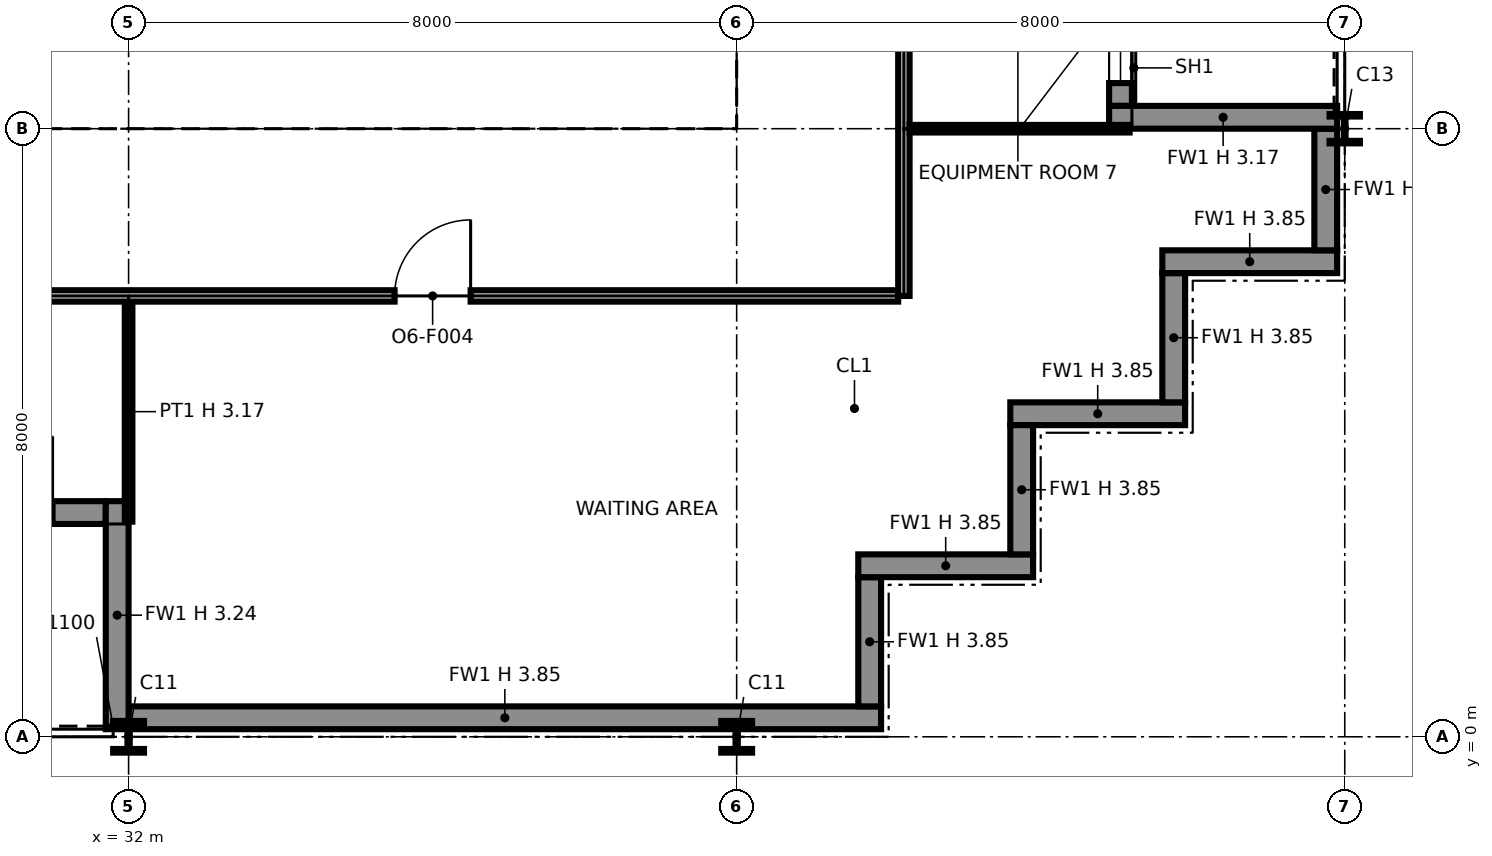
"""IFC4 building model, lengths in metres.
Left out: names, types, materials, properties, quantities, classifications, styles, units other than length and angle.
Written with IfcOpenShell. Run it as: python <this file> out.ifc"""

import sys

from ifc_helpers import new_model, si_unit, direction, frame, frame_2d, origin, origin_2d, place, context, subcontext, project, spatial, polyline, rectangle, i_section, outline, extrude, element, fill, save


model = new_model("IFC4")
c1 = context("Model", 3, precision=1e-05, world=origin(), true_north=direction((0.0, 1.0)))
c2 = subcontext(c1, "Body", "Model", "MODEL_VIEW")
j1 = project(units=[si_unit("LENGTHUNIT", "METRE"), si_unit("PLANEANGLEUNIT", "RADIAN")], contexts=[c1])
p1 = place(None, origin())
s1 = spatial("IfcSite", under=j1, at=p1, CompositionType="ELEMENT")
p2 = place(p1, origin())
s2 = spatial("IfcBuilding", under=s1, at=p2, CompositionType="ELEMENT")
p3 = place(p2, frame((0.0, 0.0, 233.0)))
s3 = spatial("IfcBuildingStorey", under=s2, at=p3, CompositionType="ELEMENT", Elevation=233.0)
p4 = place(p3, frame((32.0, 0.0, 0.0), z_axis=(0.0, 0.0, 1.0), x_axis=(1.0, 0.0, 0.0)))
e1 = element("IfcColumn", 1, at=p4, inside=s3, PredefinedType="COLUMN", context=c2, shape_type="SweptSolid", body=[
    extrude(i_section(OverallWidth=0.406, OverallDepth=0.417, WebThickness=0.03, FlangeThickness=0.048, at=origin_2d()), origin(), (0.0, 0.0, 1.0), 3.85),
])
p5 = place(p3, frame((32.0, 8.0, 0.0), z_axis=(0.0, 0.0, 1.0), x_axis=(1.0, 0.0, 0.0)))
e2 = element("IfcColumn", 2, at=p5, inside=s3, PredefinedType="COLUMN", context=c2, shape_type="SweptSolid", body=[
    extrude(i_section(OverallWidth=0.373, OverallDepth=0.368, WebThickness=0.015, FlangeThickness=0.024, at=origin_2d()), origin(), (0.0, 0.0, 1.0), 3.85),
])
p6 = place(p3, frame((40.0, 0.0, 0.0), z_axis=(0.0, 0.0, 1.0), x_axis=(1.0, 0.0, 0.0)))
e3 = element("IfcColumn", 3, at=p6, inside=s3, PredefinedType="COLUMN", context=c2, shape_type="SweptSolid", body=[
    extrude(i_section(OverallWidth=0.406, OverallDepth=0.417, WebThickness=0.03, FlangeThickness=0.048, at=origin_2d()), origin(), (0.0, 0.0, 1.0), 3.85),
])
p7 = place(p3, frame((40.0, 8.0, 0.0), z_axis=(0.0, 0.0, 1.0), x_axis=(1.0, 0.0, 0.0)))
e4 = element("IfcColumn", 4, at=p7, inside=s3, PredefinedType="COLUMN", context=c2, shape_type="SweptSolid", body=[
    extrude(i_section(OverallWidth=0.373, OverallDepth=0.368, WebThickness=0.015, FlangeThickness=0.024, at=origin_2d()), origin(), (0.0, 0.0, 1.0), 3.85),
])
p8 = place(p3, frame((48.0, 8.0, 0.0), z_axis=(0.0, 0.0, 1.0), x_axis=(1.0, 0.0, 0.0)))
e5 = element("IfcColumn", 5, at=p8, inside=s3, PredefinedType="COLUMN", context=c2, shape_type="SweptSolid", body=[
    extrude(i_section(OverallWidth=0.399, OverallDepth=0.386, WebThickness=0.021, FlangeThickness=0.033, at=origin_2d()), origin(), (0.0, 0.0, 1.0), 3.85),
])
p9 = place(p3, frame((24.3, 2.95, 0.0), z_axis=(0.0, 0.0, 1.0), x_axis=(1.0, 0.0, 0.0)))
e6 = element("IfcWall", 6, at=p9, inside=s3, PredefinedType="SOLIDWALL", context=c2, shape_type="SweptSolid", body=[
    extrude(rectangle(XDim=7.4, YDim=0.3, at=frame_2d((3.7, 0.0))), origin(), (0.0, 0.0, 1.0), 3.85),
])
p10 = place(p9, frame((0.3, 0.0, 0.9)))
e7 = element("IfcOpeningElement", 7, at=p10, cuts=e6, PredefinedType="OPENING", context=c2, shape_type="SweptSolid", body=[
    extrude(rectangle(XDim=2.8, YDim=2.2, at=frame_2d((1.4, 1.1))), frame((0.0, 0.16, 0.0), z_axis=(0.0, -1.0, 0.0), x_axis=(1.0, 0.0, 0.0)), (0.0, 0.0, 1.0), 0.32),
])
p11 = place(p9, frame((4.7, 0.0, 0.0)))
e8 = element("IfcOpeningElement", 8, at=p11, cuts=e6, PredefinedType="OPENING", context=c2, shape_type="SweptSolid", body=[
    extrude(rectangle(XDim=2.0, YDim=2.4, at=frame_2d((1.0, 1.2))), frame((0.0, 0.16, 0.0), z_axis=(0.0, -1.0, 0.0), x_axis=(1.0, 0.0, 0.0)), (0.0, 0.0, 1.0), 0.32),
])
p12 = place(p3, frame((31.85, 0.1, 0.0), z_axis=(0.0, 0.0, 1.0), x_axis=(0.0, 1.0, 0.0)))
e9 = element("IfcWall", 9, at=p12, inside=s3, PredefinedType="SOLIDWALL", context=c2, shape_type="SweptSolid", body=[
    extrude(rectangle(XDim=3.0, YDim=0.3, at=frame_2d((1.5, 0.0))), origin(), (0.0, 0.0, 1.0), 3.237),
])
p13 = place(p3, frame((32.0, 0.25, 0.0), z_axis=(0.0, 0.0, 1.0), x_axis=(1.0, 0.0, 0.0)))
e10 = element("IfcWall", 10, at=p13, inside=s3, PredefinedType="SOLIDWALL", context=c2, shape_type="SweptSolid", body=[
    extrude(rectangle(XDim=9.9, YDim=0.3, at=frame_2d((4.95, 0.0))), origin(), (0.0, 0.0, 1.0), 3.85),
])
p14 = place(p3, frame((41.75, 0.4, 0.0), z_axis=(0.0, 0.0, 1.0), x_axis=(0.0, 1.0, 0.0)))
e11 = element("IfcWall", 11, at=p14, inside=s3, PredefinedType="SOLIDWALL", context=c2, shape_type="SweptSolid", body=[
    extrude(rectangle(XDim=1.7, YDim=0.3, at=frame_2d((0.85, 0.0))), origin(), (0.0, 0.0, 1.0), 3.85),
])
p15 = place(p3, frame((41.6, 2.25, 0.0), z_axis=(0.0, 0.0, 1.0), x_axis=(1.0, 0.0, 0.0)))
e12 = element("IfcWall", 12, at=p15, inside=s3, PredefinedType="SOLIDWALL", context=c2, shape_type="SweptSolid", body=[
    extrude(rectangle(XDim=2.3, YDim=0.3, at=frame_2d((1.15, 0.0))), origin(), (0.0, 0.0, 1.0), 3.85),
])
p16 = place(p3, frame((43.75, 2.4, 0.0), z_axis=(0.0, 0.0, 1.0), x_axis=(0.0, 1.0, 0.0)))
e13 = element("IfcWall", 13, at=p16, inside=s3, PredefinedType="SOLIDWALL", context=c2, shape_type="SweptSolid", body=[
    extrude(rectangle(XDim=1.7, YDim=0.3, at=frame_2d((0.85, 0.0))), origin(), (0.0, 0.0, 1.0), 3.85),
])
p17 = place(p3, frame((43.6, 4.25, 0.0), z_axis=(0.0, 0.0, 1.0), x_axis=(1.0, 0.0, 0.0)))
e14 = element("IfcWall", 14, at=p17, inside=s3, PredefinedType="SOLIDWALL", context=c2, shape_type="SweptSolid", body=[
    extrude(rectangle(XDim=2.3, YDim=0.3, at=frame_2d((1.15, 0.0))), origin(), (0.0, 0.0, 1.0), 3.85),
])
p18 = place(p3, frame((45.75, 4.4, 0.0), z_axis=(0.0, 0.0, 1.0), x_axis=(0.0, 1.0, 0.0)))
e15 = element("IfcWall", 15, at=p18, inside=s3, PredefinedType="SOLIDWALL", context=c2, shape_type="SweptSolid", body=[
    extrude(rectangle(XDim=1.7, YDim=0.3, at=frame_2d((0.85, 0.0))), origin(), (0.0, 0.0, 1.0), 3.85),
])
p19 = place(p3, frame((45.6, 6.25, 0.0), z_axis=(0.0, 0.0, 1.0), x_axis=(1.0, 0.0, 0.0)))
e16 = element("IfcWall", 16, at=p19, inside=s3, PredefinedType="SOLIDWALL", context=c2, shape_type="SweptSolid", body=[
    extrude(rectangle(XDim=2.3, YDim=0.3, at=frame_2d((1.15, 0.0))), origin(), (0.0, 0.0, 1.0), 3.85),
])
p20 = place(p3, frame((47.75, 6.4, 0.0), z_axis=(0.0, 0.0, 1.0), x_axis=(0.0, 1.0, 0.0)))
e17 = element("IfcWall", 17, at=p20, inside=s3, PredefinedType="SOLIDWALL", context=c2, shape_type="SweptSolid", body=[
    extrude(rectangle(XDim=1.6, YDim=0.3, at=frame_2d((0.8, 0.0))), origin(), (0.0, 0.0, 1.0), 3.85),
])
p21 = place(p3, frame((45.05, 8.3, 0.0), z_axis=(0.0, 0.0, 1.0), x_axis=(0.0, 1.0, 0.0)))
e18 = element("IfcWall", 18, at=p21, inside=s3, PredefinedType="SOLIDWALL", context=c2, shape_type="SweptSolid", body=[
    extrude(rectangle(XDim=7.4, YDim=0.3, at=frame_2d((3.7, 0.0))), origin(), (0.0, 0.0, 1.0), 3.85),
])
p22 = place(p21, frame((0.3, 0.0, 0.9)))
e19 = element("IfcOpeningElement", 19, at=p22, cuts=e18, PredefinedType="OPENING", context=c2, shape_type="SweptSolid", body=[
    extrude(rectangle(XDim=2.8, YDim=2.2, at=frame_2d((1.4, 1.1))), frame((0.0, 0.16, 0.0), z_axis=(0.0, -1.0, 0.0), x_axis=(1.0, 0.0, 0.0)), (0.0, 0.0, 1.0), 0.32),
])
p23 = place(p21, frame((4.7, 0.0, 0.0)))
e20 = element("IfcOpeningElement", 20, at=p23, cuts=e18, PredefinedType="OPENING", context=c2, shape_type="SweptSolid", body=[
    extrude(rectangle(XDim=2.0, YDim=2.4, at=frame_2d((1.0, 1.2))), frame((0.0, 0.16, 0.0), z_axis=(0.0, -1.0, 0.0), x_axis=(1.0, 0.0, 0.0)), (0.0, 0.0, 1.0), 0.32),
])
p24 = place(p3, frame((47.9, 8.15, 0.0), z_axis=(0.0, 0.0, 1.0), x_axis=(-1.0, 0.0, 0.0)))
e21 = element("IfcWall", 21, at=p24, inside=s3, PredefinedType="SOLIDWALL", context=c2, shape_type="SweptSolid", body=[
    extrude(rectangle(XDim=3.0, YDim=0.3, at=frame_2d((1.5, 0.0))), origin(), (0.0, 0.0, 1.0), 3.171),
])
p25 = place(p3, frame((24.65, 8.75, 0.0), z_axis=(0.0, 0.0, 1.0), x_axis=(1.0, 0.0, 0.0)))
e22 = element("IfcWall", 22, at=p25, inside=s3, PredefinedType="PARTITIONING", context=c2, shape_type="SweptSolid", body=[
    extrude(outline(polyline([(0.0, 0.0), (14.7, 0.0), (14.7, 3.85), (7.438, 3.85), (7.438, 3.308), (7.262, 3.308), (7.261, 3.85), (0.0, 3.85), (0.0, 0.0)])), frame((0.0, 0.1, 0.0), z_axis=(0.0, -1.0, 0.0), x_axis=(1.0, 0.0, 0.0)), (0.0, 0.0, 1.0), 0.2),
])
p26 = place(p3, frame((32.0, 8.85, 0.0), z_axis=(0.0, 0.0, 1.0), x_axis=(0.0, 1.0, 0.0)))
e23 = element("IfcWall", 23, at=p26, inside=s3, PredefinedType="PARTITIONING", context=c2, shape_type="SweptSolid", body=[
    extrude(rectangle(XDim=2.55, YDim=0.6, at=frame_2d((1.275, 0.0))), origin(), (0.0, 0.0, 1.0), 3.308),
])
for number, where, z_axis, x_axis in (
    (24, (35.6, 8.85, 0.0), (0.0, 0.0, 1.0), (0.0, 1.0, 0.0)),
    (25, (39.25, 8.85, 0.0), (0.0, 0.0, 1.0), (0.0, 1.0, 0.0)),
):
    element("IfcWall", number, at=place(p3, frame(where, z_axis=z_axis, x_axis=x_axis)), inside=s3, PredefinedType="PARTITIONING", context=c2, shape_type="SweptSolid", body=[
        extrude(rectangle(XDim=6.3, YDim=0.2, at=frame_2d((3.15, 0.0))), origin(), (0.0, 0.0, 1.0), 3.85),
    ])
p27 = place(p3, frame((32.0, 2.83, 0.0), z_axis=(0.0, 0.0, 1.0), x_axis=(0.0, 1.0, 0.0)))
e26 = element("IfcWall", 26, at=p27, inside=s3, PredefinedType="PARTITIONING", context=c2, shape_type="SweptSolid", body=[
    extrude(rectangle(XDim=2.895, YDim=0.1, at=frame_2d((1.448, 0.0))), origin(), (0.0, 0.0, 1.0), 3.172),
])
p28 = place(p3, frame((5.875, 5.8, 0.0), z_axis=(0.0, 0.0, 1.0), x_axis=(1.0, 0.0, 0.0)))
e27 = element("IfcWall", 27, at=p28, inside=s3, PredefinedType="PARTITIONING", context=c2, shape_type="SweptSolid", body=[
    extrude(rectangle(XDim=36.25, YDim=0.15, at=frame_2d((18.125, 0.0))), origin(), (0.0, 0.0, 1.0), 3.85),
])
p29 = place(p28, frame((11.625, 0.0, 0.0)))
e28 = element("IfcOpeningElement", 28, at=p29, cuts=e27, PredefinedType="OPENING", context=c2, shape_type="SweptSolid", body=[
    extrude(rectangle(XDim=1.0, YDim=2.1, at=frame_2d((0.5, 1.05))), frame((0.0, 0.085, 0.0), z_axis=(0.0, -1.0, 0.0), x_axis=(1.0, 0.0, 0.0)), (0.0, 0.0, 1.0), 0.17),
])
p30 = place(p28, frame((16.625, 0.0, 0.0), z_axis=(0.0, 0.0, 1.0), x_axis=(-1.0, 0.0, 0.0)))
e29 = element("IfcOpeningElement", 29, at=p30, cuts=e27, PredefinedType="OPENING", context=c2, shape_type="SweptSolid", body=[
    extrude(rectangle(XDim=1.0, YDim=2.1, at=frame_2d((0.5, 1.05))), frame((0.0, 0.085, 0.0), z_axis=(0.0, -1.0, 0.0), x_axis=(1.0, 0.0, 0.0)), (0.0, 0.0, 1.0), 0.17),
])
p31 = place(p28, frame((29.625, 0.0, 0.0)))
e30 = element("IfcOpeningElement", 30, at=p31, cuts=e27, PredefinedType="OPENING", context=c2, shape_type="SweptSolid", body=[
    extrude(rectangle(XDim=1.0, YDim=2.1, at=frame_2d((0.5, 1.05))), frame((0.0, 0.085, 0.0), z_axis=(0.0, -1.0, 0.0), x_axis=(1.0, 0.0, 0.0)), (0.0, 0.0, 1.0), 0.17),
])
p32 = place(p28, frame((4.625, 0.0, 0.0), z_axis=(0.0, 0.0, 1.0), x_axis=(-1.0, 0.0, 0.0)))
e31 = element("IfcOpeningElement", 31, at=p32, cuts=e27, PredefinedType="OPENING", context=c2, shape_type="SweptSolid", body=[
    extrude(rectangle(XDim=1.0, YDim=2.1, at=frame_2d((0.5, 1.05))), frame((0.0, 0.085, 0.0), z_axis=(0.0, -1.0, 0.0), x_axis=(1.0, 0.0, 0.0)), (0.0, 0.0, 1.0), 0.17),
])
p33 = place(p28, frame((8.625, 0.0, 0.0), z_axis=(0.0, 0.0, 1.0), x_axis=(-1.0, 0.0, 0.0)))
e32 = element("IfcOpeningElement", 32, at=p33, cuts=e27, PredefinedType="OPENING", context=c2, shape_type="SweptSolid", body=[
    extrude(rectangle(XDim=1.0, YDim=2.1, at=frame_2d((0.5, 1.05))), frame((0.0, 0.085, 0.0), z_axis=(0.0, -1.0, 0.0), x_axis=(1.0, 0.0, 0.0)), (0.0, 0.0, 1.0), 0.17),
])
p34 = place(p28, frame((22.725, 0.0, 0.0)))
e33 = element("IfcOpeningElement", 33, at=p34, cuts=e27, PredefinedType="OPENING", context=c2, shape_type="SweptSolid", body=[
    extrude(rectangle(XDim=1.0, YDim=2.1, at=frame_2d((0.5, 1.05))), frame((0.0, 0.085, 0.0), z_axis=(0.0, -1.0, 0.0), x_axis=(1.0, 0.0, 0.0)), (0.0, 0.0, 1.0), 0.17),
])
p35 = place(p3, frame((42.2, 5.8, 0.0), z_axis=(0.0, 0.0, 1.0), x_axis=(0.0, 1.0, 0.0)))
e34 = element("IfcWall", 34, at=p35, inside=s3, PredefinedType="PARTITIONING", context=c2, shape_type="SweptSolid", body=[
    extrude(outline(polyline([(0.0, 0.0), (12.325, 0.0), (12.325, 3.85), (10.5, 3.85), (10.498, 3.172), (9.902, 3.172), (9.9, 3.85), (6.5, 3.85), (6.498, 3.172), (5.902, 3.172), (5.9, 3.85), (2.5, 3.85), (2.498, 3.172), (1.902, 3.172), (1.9, 3.85), (0.0, 3.85), (0.0, 0.0)])), frame((0.0, 0.075, 0.0), z_axis=(0.0, -1.0, 0.0), x_axis=(1.0, 0.0, 0.0)), (0.0, 0.0, 1.0), 0.15),
])
p36 = place(p35, frame((4.7, 0.0, 0.0), z_axis=(0.0, 0.0, 1.0), x_axis=(-1.0, 0.0, 0.0)))
e35 = element("IfcOpeningElement", 35, at=p36, cuts=e34, PredefinedType="OPENING", context=c2, shape_type="SweptSolid", body=[
    extrude(rectangle(XDim=1.0, YDim=2.1, at=frame_2d((0.5, 1.05))), frame((0.0, 0.085, 0.0), z_axis=(0.0, -1.0, 0.0), x_axis=(1.0, 0.0, 0.0)), (0.0, 0.0, 1.0), 0.17),
])
p37 = place(p35, frame((8.7, 0.0, 0.0), z_axis=(0.0, 0.0, 1.0), x_axis=(-1.0, 0.0, 0.0)))
e36 = element("IfcOpeningElement", 36, at=p37, cuts=e34, PredefinedType="OPENING", context=c2, shape_type="SweptSolid", body=[
    extrude(rectangle(XDim=1.0, YDim=2.1, at=frame_2d((0.5, 1.05))), frame((0.0, 0.085, 0.0), z_axis=(0.0, -1.0, 0.0), x_axis=(1.0, 0.0, 0.0)), (0.0, 0.0, 1.0), 0.17),
])
p38 = place(p3, frame((42.275, 8.0, 0.0), z_axis=(0.0, 0.0, 1.0), x_axis=(1.0, 0.0, 0.0)))
e37 = element("IfcWall", 37, at=p38, inside=s3, PredefinedType="PARTITIONING", context=c2, shape_type="SweptSolid", body=[
    extrude(rectangle(XDim=2.895, YDim=0.1, at=frame_2d((1.448, 0.0))), origin(), (0.0, 0.0, 1.0), 3.172),
])
p39 = place(p22, origin())
e38 = element("IfcWindow", 38, at=p39, inside=s3, PartitioningType="SINGLE_PANEL", PredefinedType="WINDOW", context=c2, shape_type="SweptSolid", body=[
    extrude(rectangle(XDim=2.8, YDim=2.2, at=frame_2d((1.4, 1.1))), frame((0.0, 0.03, 0.0), z_axis=(0.0, -1.0, 0.0), x_axis=(1.0, 0.0, 0.0)), (0.0, 0.0, 1.0), 0.06),
])
fill(e19, e38)
p40 = place(p31, origin())
e39 = element("IfcDoor", 39, at=p40, inside=s3, OperationType="SINGLE_SWING_RIGHT", PredefinedType="DOOR", context=c2, shape_type="SweptSolid", body=[
    extrude(rectangle(XDim=1.0, YDim=2.1, at=frame_2d((0.5, 1.05))), frame((0.0, 0.025, 0.0), z_axis=(0.0, -1.0, 0.0), x_axis=(1.0, 0.0, 0.0)), (0.0, 0.0, 1.0), 0.05),
])
fill(e30, e39)
save(model, sys.argv[1])
